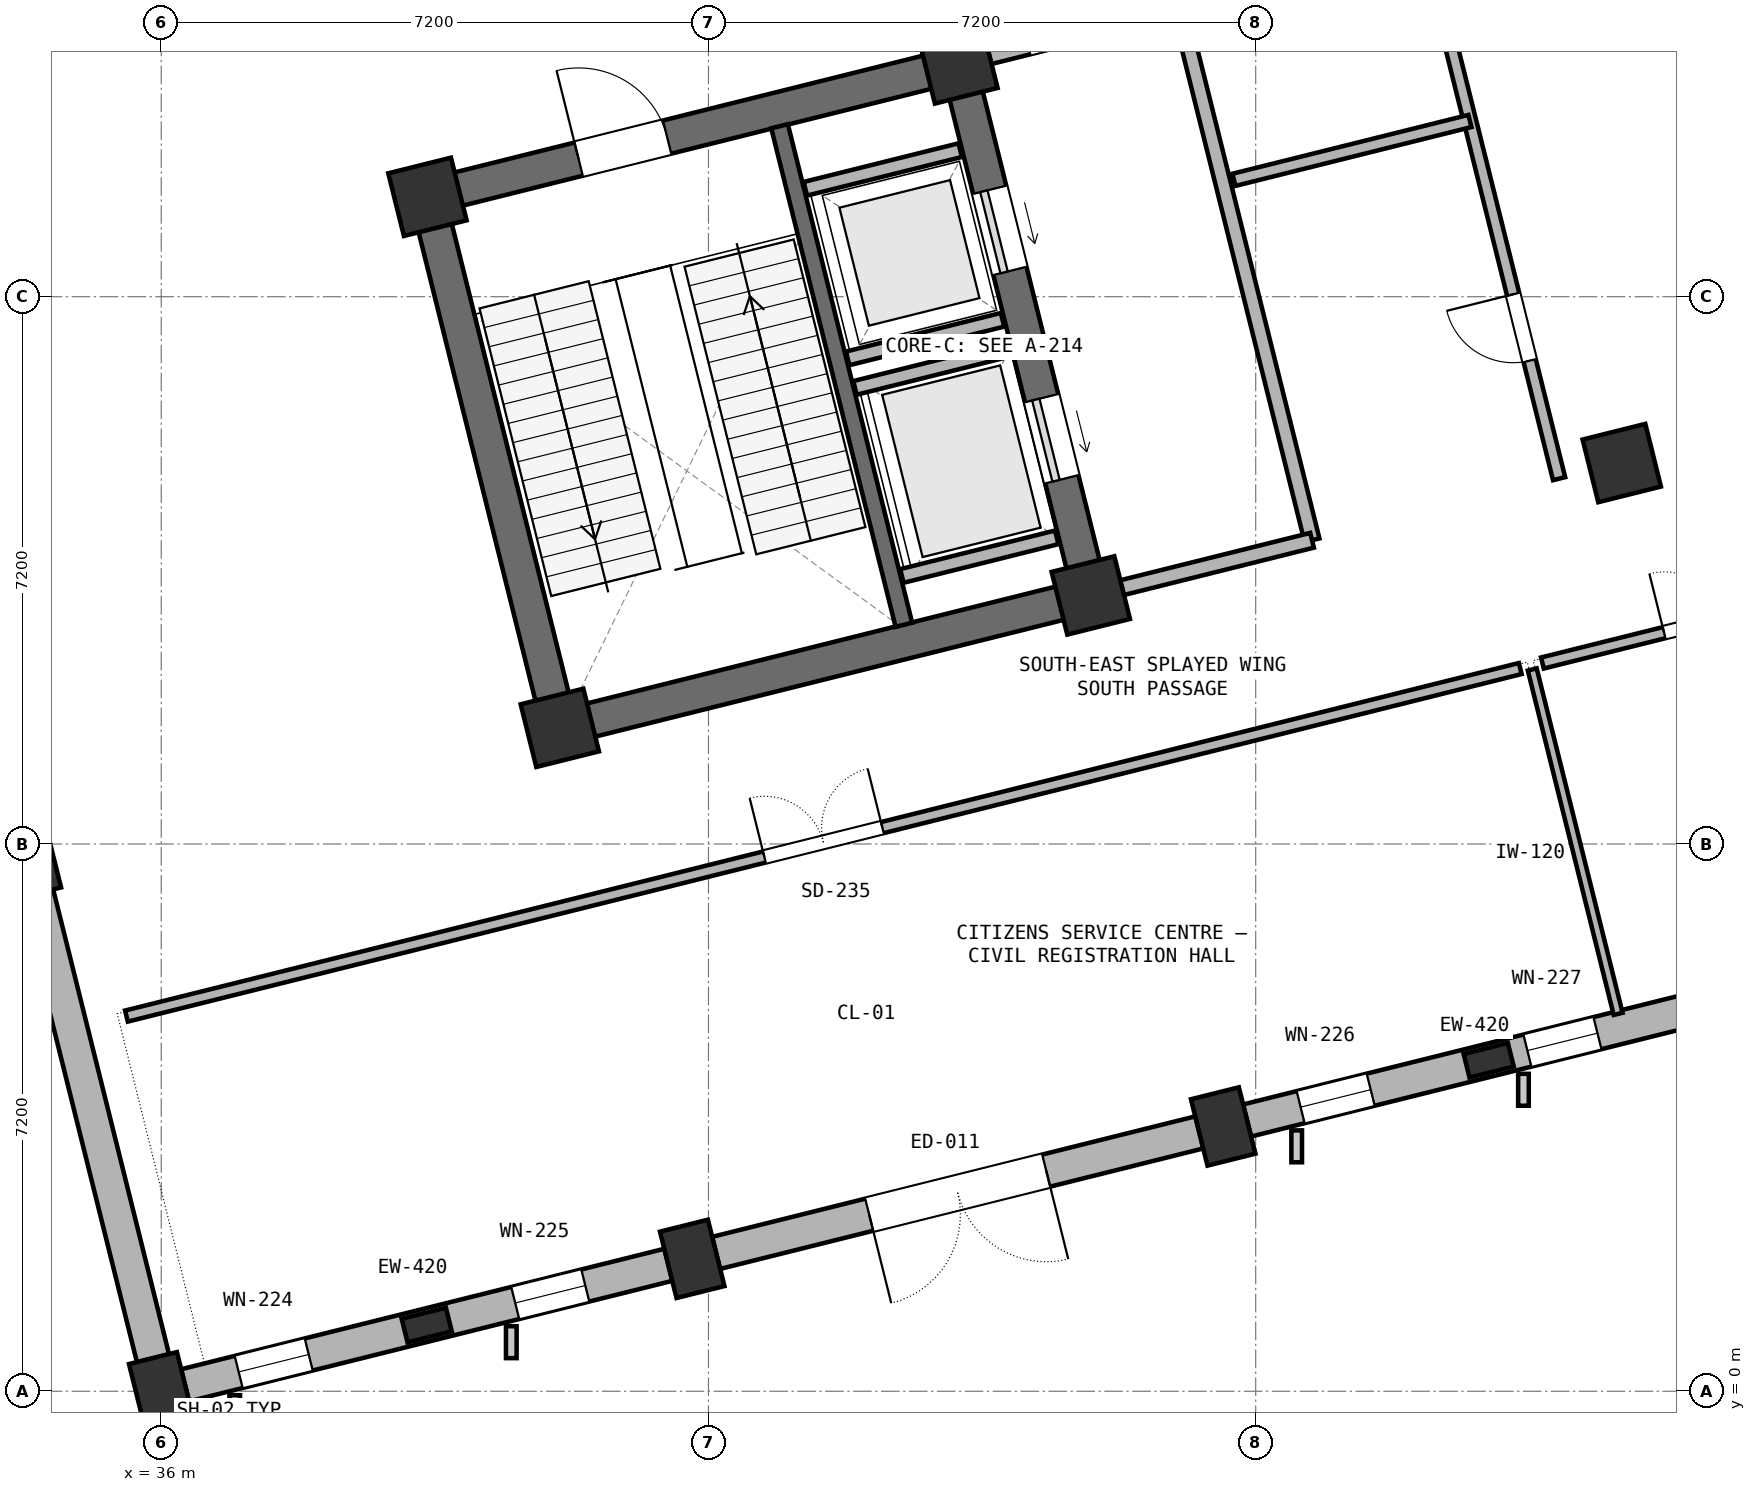
"""IFC4 building model, lengths in metres.
Left out: names, types, materials, properties, quantities, classifications, styles, units other than length and angle.
Written with IfcOpenShell. Run it as: python <this file> out.ifc"""

import sys

from ifc_helpers import new_model, si_unit, direction, frame, frame_2d, origin, origin_2d, place, context, subcontext, project, spatial, rectangle, extrude, element, fill, save


model = new_model("IFC4")
c1 = context("Model", 3, precision=1e-05, world=origin(), true_north=direction((0.0, 1.0)))
c2 = subcontext(c1, "Body", "Model", "MODEL_VIEW")
j1 = project(units=[si_unit("LENGTHUNIT", "METRE"), si_unit("PLANEANGLEUNIT", "RADIAN")], contexts=[c1])
p1 = place(None, origin())
s1 = spatial("IfcSite", under=j1, at=p1, CompositionType="ELEMENT")
p2 = place(p1, origin())
s2 = spatial("IfcBuilding", under=s1, at=p2, CompositionType="ELEMENT")
p3 = place(p2, origin())
s3 = spatial("IfcBuildingStorey", under=s2, at=p3, CompositionType="ELEMENT", Elevation=0.0)
for number, where, z_axis, x_axis in (
    (1, (36.0, 0.0, 0.0), (0.0, 0.0, 1.0), (0.97, 0.242, 0.0)),
    (2, (34.258, 6.986, 0.0), (0.0, 0.0, 1.0), (0.97, 0.242, 0.0)),
    (3, (42.986, 1.742, 0.0), (0.0, 0.0, 1.0), (0.97, 0.242, 0.0)),
):
    element("IfcColumn", number, at=place(p3, frame(where, z_axis=z_axis, x_axis=x_axis)), inside=s3, PredefinedType="COLUMN", context=c2, shape_type="SweptSolid", body=[
        extrude(rectangle(XDim=0.65, YDim=0.9, at=origin_2d()), origin(), (0.0, 0.0, 1.0), 5.4),
    ])
for number, where, z_axis, x_axis in (
    (4, (41.244, 8.728, 0.0), (0.0, 0.0, 1.0), (0.97, 0.242, 0.0)),
    (5, (39.502, 15.714, 0.0), (0.0, 0.0, 1.0), (0.97, 0.242, 0.0)),
):
    element("IfcColumn", number, at=place(p3, frame(where, z_axis=z_axis, x_axis=x_axis)), inside=s3, PredefinedType="COLUMN", context=c2, shape_type="SweptSolid", body=[
        extrude(rectangle(XDim=0.85, YDim=0.85, at=origin_2d()), origin(), (0.0, 0.0, 1.0), 5.4),
    ])
p4 = place(p3, frame((49.972, 3.484, 0.0), z_axis=(0.0, 0.0, 1.0), x_axis=(0.970295726276, 0.2419218956, 0.0)))
e6 = element("IfcColumn", 6, at=p4, inside=s3, PredefinedType="COLUMN", context=c2, shape_type="SweptSolid", body=[
    extrude(rectangle(XDim=0.65, YDim=0.9, at=origin_2d()), origin(), (0.0, 0.0, 1.0), 5.4),
])
for number, where, z_axis, x_axis in (
    (7, (48.23, 10.47, 0.0), (0.0, 0.0, 1.0), (0.97, 0.242, 0.0)),
    (8, (46.489, 17.456, 0.0), (0.0, 0.0, 1.0), (0.97, 0.242, 0.0)),
    (9, (55.217, 12.212, 0.0), (0.0, 0.0, 1.0), (0.97, 0.242, 0.0)),
):
    element("IfcColumn", number, at=place(p3, frame(where, z_axis=z_axis, x_axis=x_axis)), inside=s3, PredefinedType="COLUMN", context=c2, shape_type="SweptSolid", body=[
        extrude(rectangle(XDim=0.85, YDim=0.85, at=origin_2d()), origin(), (0.0, 0.0, 1.0), 5.4),
    ])
for number, where, z_axis, x_axis in (
    (10, (39.493, 0.871, 0.0), (0.0, 0.0, 1.0), (0.97, 0.242, 0.0)),
    (11, (53.465, 4.354, 0.0), (0.0, 0.0, 1.0), (0.97, 0.242, 0.0)),
):
    element("IfcColumn", number, at=place(p3, frame(where, z_axis=z_axis, x_axis=x_axis)), inside=s3, PredefinedType="PILASTER", context=c2, shape_type="SweptSolid", body=[
        extrude(rectangle(XDim=0.6, YDim=0.32, at=origin_2d()), origin(), (0.0, 0.0, 1.0), 5.4),
    ])
p5 = place(p3, frame((41.584, 8.813, 0.0), z_axis=(0.0, 0.0, 1.0), x_axis=(0.970294759049, 0.241925774902, 0.0)))
e12 = element("IfcWall", 12, at=p5, inside=s3, PredefinedType="SHEAR", context=c2, shape_type="SweptSolid", body=[
    extrude(rectangle(XDim=6.5, YDim=0.45, at=frame_2d((3.25, 0.0))), origin(), (0.0, 0.0, 1.0), 5.4),
])
p6 = place(p3, frame((48.146, 10.809, 0.0), z_axis=(0.0, 0.0, 1.0), x_axis=(-0.241925774902, 0.970294759049, 0.0)))
e13 = element("IfcWall", 13, at=p6, inside=s3, PredefinedType="SHEAR", context=c2, shape_type="SweptSolid", body=[
    extrude(rectangle(XDim=6.5, YDim=0.45, at=frame_2d((3.25, 0.0))), origin(), (0.0, 0.0, 1.0), 5.4),
])
p7 = place(p6, frame((1.225, 0.0, 0.0)))
e14 = element("IfcOpeningElement", 14, at=p7, cuts=e13, PredefinedType="OPENING", context=c2, shape_type="SweptSolid", body=[
    extrude(rectangle(XDim=1.1, YDim=2.2, at=frame_2d((0.55, 1.1))), frame((0.0, 0.235, 0.0), z_axis=(0.0, -1.0, 0.0), x_axis=(1.0, 0.0, 0.0)), (0.0, 0.0, 1.0), 0.47),
])
p8 = place(p6, frame((4.05, 0.0, 0.0)))
e15 = element("IfcOpeningElement", 15, at=p8, cuts=e13, PredefinedType="OPENING", context=c2, shape_type="SweptSolid", body=[
    extrude(rectangle(XDim=1.1, YDim=2.2, at=frame_2d((0.55, 1.1))), frame((0.0, 0.235, 0.0), z_axis=(0.0, -1.0, 0.0), x_axis=(1.0, 0.0, 0.0)), (0.0, 0.0, 1.0), 0.47),
])
p9 = place(p3, frame((46.149, 17.371, 0.0), z_axis=(0.0, 0.0, 1.0), x_axis=(-0.970294759049, -0.241925774902, 0.0)))
e16 = element("IfcWall", 16, at=p9, inside=s3, PredefinedType="SHEAR", context=c2, shape_type="SweptSolid", body=[
    extrude(rectangle(XDim=6.5, YDim=0.45, at=frame_2d((3.25, 0.0))), origin(), (0.0, 0.0, 1.0), 5.4),
])
p10 = place(p9, frame((3.6, 0.0, 0.0)))
e17 = element("IfcOpeningElement", 17, at=p10, cuts=e16, PredefinedType="OPENING", context=c2, shape_type="SweptSolid", body=[
    extrude(rectangle(XDim=1.2, YDim=2.2, at=frame_2d((0.6, 1.1))), frame((0.0, 0.235, 0.0), z_axis=(0.0, -1.0, 0.0), x_axis=(1.0, 0.0, 0.0)), (0.0, 0.0, 1.0), 0.47),
])
p11 = place(p3, frame((39.587, 15.375, 0.0), z_axis=(0.0, 0.0, 1.0), x_axis=(0.241925774902, -0.970294759049, 0.0)))
e18 = element("IfcWall", 18, at=p11, inside=s3, PredefinedType="SHEAR", context=c2, shape_type="SweptSolid", body=[
    extrude(rectangle(XDim=6.5, YDim=0.45, at=frame_2d((3.25, 0.0))), origin(), (0.0, 0.0, 1.0), 5.4),
])
p12 = place(p3, frame((45.771, 10.083, 0.0), z_axis=(0.0, 0.0, 1.0), x_axis=(-0.241898249226, 0.970301621673, 0.0)))
e19 = element("IfcWall", 19, at=p12, inside=s3, PredefinedType="SHEAR", context=c2, shape_type="SweptSolid", body=[
    extrude(rectangle(XDim=6.76, YDim=0.225, at=frame_2d((3.38, 0.0))), origin(), (0.0, 0.0, 1.0), 5.4),
])
for number, where, z_axis, x_axis in (
    (20, (45.745, 10.726, 0.0), (0.0, 0.0, 1.0), (0.97, 0.242, 0.0)),
    (21, (45.128, 13.2, 0.0), (0.0, 0.0, 1.0), (0.97, 0.242, 0.0)),
    (22, (45.031, 13.588, 0.0), (0.0, 0.0, 1.0), (0.97, 0.242, 0.0)),
    (23, (44.475, 15.82, 0.0), (0.0, 0.0, 1.0), (0.97, 0.242, 0.0)),
):
    element("IfcWall", number, at=place(p3, frame(where, z_axis=z_axis, x_axis=x_axis)), inside=s3, PredefinedType="PARTITIONING", context=c2, shape_type="SweptSolid", body=[
        extrude(rectangle(XDim=2.1, YDim=0.185, at=frame_2d((1.05, 0.0))), origin(), (0.0, 0.0, 1.0), 5.4),
    ])
p13 = place(p3, frame((36.313, 0.078, 0.0), z_axis=(0.0, 0.0, 1.0), x_axis=(0.970289137034, 0.241948322073, 0.0)))
e24 = element("IfcWall", 24, at=p13, inside=s3, PredefinedType="SOLIDWALL", context=c2, shape_type="SweptSolid", body=[
    extrude(rectangle(XDim=6.554, YDim=0.435, at=frame_2d((3.277, 0.0))), origin(), (0.0, 0.0, 1.0), 4.1),
])
p14 = place(p13, frame((0.727, 0.0, 0.7)))
e25 = element("IfcOpeningElement", 25, at=p14, cuts=e24, PredefinedType="OPENING", context=c2, shape_type="SweptSolid", body=[
    extrude(rectangle(XDim=0.95, YDim=2.4, at=frame_2d((0.475, 1.2))), frame((0.0, 0.228, 0.0), z_axis=(0.0, -1.0, 0.0), x_axis=(1.0, 0.0, 0.0)), (0.0, 0.0, 1.0), 0.455),
])
p15 = place(p13, frame((4.477, 0.0, 0.7)))
e26 = element("IfcOpeningElement", 26, at=p15, cuts=e24, PredefinedType="OPENING", context=c2, shape_type="SweptSolid", body=[
    extrude(rectangle(XDim=0.95, YDim=2.4, at=frame_2d((0.475, 1.2))), frame((0.0, 0.228, 0.0), z_axis=(0.0, -1.0, 0.0), x_axis=(1.0, 0.0, 0.0)), (0.0, 0.0, 1.0), 0.455),
])
p16 = place(p3, frame((43.3, 1.82, 0.0), z_axis=(0.0, 0.0, 1.0), x_axis=(0.970300061562, 0.241904507055, 0.0)))
e27 = element("IfcWall", 27, at=p16, inside=s3, PredefinedType="SOLIDWALL", context=c2, shape_type="SweptSolid", body=[
    extrude(rectangle(XDim=6.554, YDim=0.435, at=frame_2d((3.277, 0.0))), origin(), (0.0, 0.0, 1.0), 4.1),
])
p17 = place(p16, frame((2.077, 0.0, 0.0)))
e28 = element("IfcOpeningElement", 28, at=p17, cuts=e27, PredefinedType="OPENING", context=c2, shape_type="SweptSolid", body=[
    extrude(rectangle(XDim=2.4, YDim=2.8, at=frame_2d((1.2, 1.4))), frame((0.0, 0.228, 0.0), z_axis=(0.0, -1.0, 0.0), x_axis=(1.0, 0.0, 0.0)), (0.0, 0.0, 1.0), 0.455),
])
p18 = place(p3, frame((50.286, 3.562, 0.0), z_axis=(0.0, 0.0, 1.0), x_axis=(0.970291317579, 0.24193957723, 0.0)))
e29 = element("IfcWall", 29, at=p18, inside=s3, PredefinedType="SOLIDWALL", context=c2, shape_type="SweptSolid", body=[
    extrude(rectangle(XDim=6.554, YDim=0.435, at=frame_2d((3.277, 0.0))), origin(), (0.0, 0.0, 1.0), 4.1),
])
p19 = place(p18, frame((0.727, 0.0, 0.7)))
e30 = element("IfcOpeningElement", 30, at=p19, cuts=e29, PredefinedType="OPENING", context=c2, shape_type="SweptSolid", body=[
    extrude(rectangle(XDim=0.95, YDim=2.4, at=frame_2d((0.475, 1.2))), frame((0.0, 0.228, 0.0), z_axis=(0.0, -1.0, 0.0), x_axis=(1.0, 0.0, 0.0)), (0.0, 0.0, 1.0), 0.455),
])
p20 = place(p18, frame((3.802, 0.0, 0.7)))
e31 = element("IfcOpeningElement", 31, at=p20, cuts=e29, PredefinedType="OPENING", context=c2, shape_type="SweptSolid", body=[
    extrude(rectangle(XDim=0.95, YDim=2.4, at=frame_2d((0.475, 1.2))), frame((0.0, 0.228, 0.0), z_axis=(0.0, -1.0, 0.0), x_axis=(1.0, 0.0, 0.0)), (0.0, 0.0, 1.0), 0.455),
])
p21 = place(p3, frame((34.366, 6.552, 0.0), z_axis=(0.0, 0.0, 1.0), x_axis=(0.241934154531, -0.970292669699, 0.0)))
e32 = element("IfcWall", 32, at=p21, inside=s3, PredefinedType="SOLIDWALL", context=c2, shape_type="SweptSolid", body=[
    extrude(rectangle(XDim=6.304, YDim=0.435, at=frame_2d((3.152, 0.0))), origin(), (0.0, 0.0, 1.0), 4.1),
])
p22 = place(p3, frame((51.141, 11.196, 0.0), z_axis=(0.0, 0.0, 1.0), x_axis=(-0.241937193493, 0.970291911955, 0.0)))
e33 = element("IfcWall", 33, at=p22, inside=s3, PredefinedType="PARTITIONING", context=c2, shape_type="SweptSolid", body=[
    extrude(rectangle(XDim=7.2, YDim=0.2, at=frame_2d((3.6, 0.0))), origin(), (0.0, 0.0, 1.0), 4.12),
])
p23 = place(p3, frame((48.638, 10.572, 0.0), z_axis=(0.0, 0.0, 1.0), x_axis=(0.970309259708, 0.2418676095, 0.0)))
e34 = element("IfcWall", 34, at=p23, inside=s3, PredefinedType="PARTITIONING", context=c2, shape_type="SweptSolid", body=[
    extrude(rectangle(XDim=2.58, YDim=0.2, at=frame_2d((1.29, 0.0))), origin(), (0.0, 0.0, 1.0), 4.12),
])
p24 = place(p3, frame((49.399, 18.182, 0.0), z_axis=(0.0, 0.0, 1.0), x_axis=(-0.970309259708, -0.2418676095, 0.0)))
e35 = element("IfcWall", 35, at=p24, inside=s3, PredefinedType="PARTITIONING", context=c2, shape_type="SweptSolid", body=[
    extrude(rectangle(XDim=2.58, YDim=0.2, at=frame_2d((1.29, 0.0))), origin(), (0.0, 0.0, 1.0), 4.12),
])
p25 = place(p24, frame((0.55, 0.0, 0.0)))
e36 = element("IfcOpeningElement", 36, at=p25, cuts=e35, PredefinedType="OPENING", context=c2, shape_type="SweptSolid", body=[
    extrude(rectangle(XDim=1.5, YDim=2.2, at=frame_2d((0.75, 1.1))), frame((0.0, 0.11, 0.0), z_axis=(0.0, -1.0, 0.0), x_axis=(1.0, 0.0, 0.0)), (0.0, 0.0, 1.0), 0.22),
])
p26 = place(p3, frame((54.392, 12.006, 0.0), z_axis=(0.0, 0.0, 1.0), x_axis=(-0.241937193493, 0.970291911955, 0.0)))
e37 = element("IfcWall", 37, at=p26, inside=s3, PredefinedType="PARTITIONING", context=c2, shape_type="SweptSolid", body=[
    extrude(rectangle(XDim=7.2, YDim=0.165, at=frame_2d((3.6, 0.0))), origin(), (0.0, 0.0, 1.0), 4.12),
])
p27 = place(p26, frame((1.6, 0.0, 0.0)))
e38 = element("IfcOpeningElement", 38, at=p27, cuts=e37, PredefinedType="OPENING", context=c2, shape_type="SweptSolid", body=[
    extrude(rectangle(XDim=0.9, YDim=2.15, at=frame_2d((0.45, 1.075))), frame((0.0, 0.093, 0.0), z_axis=(0.0, -1.0, 0.0), x_axis=(1.0, 0.0, 0.0)), (0.0, 0.0, 1.0), 0.185),
])
p28 = place(p3, frame((50.114, 15.938, 0.0), z_axis=(0.0, 0.0, 1.0), x_axis=(0.970294894235, 0.241925232711, 0.0)))
e39 = element("IfcWall", 39, at=p28, inside=s3, PredefinedType="PARTITIONING", context=c2, shape_type="SweptSolid", body=[
    extrude(rectangle(XDim=3.2, YDim=0.165, at=frame_2d((1.6, 0.0))), origin(), (0.0, 0.0, 1.0), 4.12),
])
p29 = place(p3, frame((35.542, 4.936, 0.0), z_axis=(0.0, 0.0, 1.0), x_axis=(0.970293521635, 0.241930737758, 0.0)))
e40 = element("IfcWall", 40, at=p29, inside=s3, PredefinedType="PARTITIONING", context=c2, shape_type="SweptSolid", body=[
    extrude(rectangle(XDim=18.9, YDim=0.15, at=frame_2d((9.45, 0.0))), origin(), (0.0, 0.0, 1.0), 4.12),
])
p30 = place(p29, frame((8.65, 0.0, 0.0)))
e41 = element("IfcOpeningElement", 41, at=p30, cuts=e40, PredefinedType="OPENING", context=c2, shape_type="SweptSolid", body=[
    extrude(rectangle(XDim=1.6, YDim=2.2, at=frame_2d((0.8, 1.1))), frame((0.0, 0.085, 0.0), z_axis=(0.0, -1.0, 0.0), x_axis=(1.0, 0.0, 0.0)), (0.0, 0.0, 1.0), 0.17),
])
p31 = place(p3, frame((54.172, 9.581, 0.0), z_axis=(0.0, 0.0, 1.0), x_axis=(0.970297344298, 0.241915405976, 0.0)))
e42 = element("IfcWall", 42, at=p31, inside=s3, PredefinedType="PARTITIONING", context=c2, shape_type="SweptSolid", body=[
    extrude(rectangle(XDim=20.1, YDim=0.15, at=frame_2d((10.05, 0.0))), origin(), (0.0, 0.0, 1.0), 4.12),
])
p32 = place(p31, frame((1.65, 0.0, 0.0)))
e43 = element("IfcOpeningElement", 43, at=p32, cuts=e42, PredefinedType="OPENING", context=c2, shape_type="SweptSolid", body=[
    extrude(rectangle(XDim=1.6, YDim=2.2, at=frame_2d((0.8, 1.1))), frame((0.0, 0.085, 0.0), z_axis=(0.0, -1.0, 0.0), x_axis=(1.0, 0.0, 0.0)), (0.0, 0.0, 1.0), 0.17),
])
p33 = place(p3, frame((55.168, 4.965, 0.0), z_axis=(0.0, 0.0, 1.0), x_axis=(-0.241883650802, 0.970305260975, 0.0)))
e44 = element("IfcWall", 44, at=p33, inside=s3, PredefinedType="PARTITIONING", context=c2, shape_type="SweptSolid", body=[
    extrude(rectangle(XDim=4.67, YDim=0.12, at=frame_2d((2.335, 0.0))), origin(), (0.0, 0.0, 1.0), 4.12),
])
p34 = place(p3, frame((57.242, 13.18, 0.0), z_axis=(0.0, 0.0, 1.0), x_axis=(-0.241947566099, 0.970289325541, 0.0)))
e45 = element("IfcWall", 45, at=p34, inside=s3, PredefinedType="PARTITIONING", context=c2, shape_type="SweptSolid", body=[
    extrude(rectangle(XDim=6.35, YDim=0.12, at=frame_2d((3.175, 0.0))), origin(), (0.0, 0.0, 1.0), 4.12),
])
p35 = place(p7, origin())
e46 = element("IfcDoor", 46, at=p35, inside=s3, OperationType="SLIDING_TO_LEFT", PredefinedType="DOOR", context=c2, shape_type="SweptSolid", body=[
    extrude(rectangle(XDim=1.1, YDim=2.2, at=frame_2d((0.55, 1.1))), frame((0.0, 0.025, 0.0), z_axis=(0.0, -1.0, 0.0), x_axis=(1.0, 0.0, 0.0)), (0.0, 0.0, 1.0), 0.05),
])
fill(e14, e46)
p36 = place(p8, origin())
e47 = element("IfcDoor", 47, at=p36, inside=s3, OperationType="SLIDING_TO_LEFT", PredefinedType="DOOR", context=c2, shape_type="SweptSolid", body=[
    extrude(rectangle(XDim=1.1, YDim=2.2, at=frame_2d((0.55, 1.1))), frame((0.0, 0.025, 0.0), z_axis=(0.0, -1.0, 0.0), x_axis=(1.0, 0.0, 0.0)), (0.0, 0.0, 1.0), 0.05),
])
fill(e15, e47)
p37 = place(p14, origin())
e48 = element("IfcWindow", 48, at=p37, inside=s3, PartitioningType="SINGLE_PANEL", PredefinedType="WINDOW", context=c2, shape_type="SweptSolid", body=[
    extrude(rectangle(XDim=0.95, YDim=2.4, at=frame_2d((0.475, 1.2))), frame((0.0, 0.03, 0.0), z_axis=(0.0, -1.0, 0.0), x_axis=(1.0, 0.0, 0.0)), (0.0, 0.0, 1.0), 0.06),
])
fill(e25, e48)
p38 = place(p15, origin())
e49 = element("IfcWindow", 49, at=p38, inside=s3, PartitioningType="SINGLE_PANEL", PredefinedType="WINDOW", context=c2, shape_type="SweptSolid", body=[
    extrude(rectangle(XDim=0.95, YDim=2.4, at=frame_2d((0.475, 1.2))), frame((0.0, 0.03, 0.0), z_axis=(0.0, -1.0, 0.0), x_axis=(1.0, 0.0, 0.0)), (0.0, 0.0, 1.0), 0.06),
])
fill(e26, e49)
p39 = place(p17, frame((2.4, 0.0, 0.0), z_axis=(0.0, 0.0, 1.0), x_axis=(-1.0, 0.0, 0.0)))
e50 = element("IfcDoor", 50, at=p39, inside=s3, OperationType="DOUBLE_DOOR_SINGLE_SWING", PredefinedType="DOOR", context=c2, shape_type="SweptSolid", body=[
    extrude(rectangle(XDim=2.4, YDim=2.8, at=frame_2d((1.2, 1.4))), frame((0.0, 0.025, 0.0), z_axis=(0.0, -1.0, 0.0), x_axis=(1.0, 0.0, 0.0)), (0.0, 0.0, 1.0), 0.05),
])
fill(e28, e50)
p40 = place(p19, origin())
e51 = element("IfcWindow", 51, at=p40, inside=s3, PartitioningType="SINGLE_PANEL", PredefinedType="WINDOW", context=c2, shape_type="SweptSolid", body=[
    extrude(rectangle(XDim=0.95, YDim=2.4, at=frame_2d((0.475, 1.2))), frame((0.0, 0.03, 0.0), z_axis=(0.0, -1.0, 0.0), x_axis=(1.0, 0.0, 0.0)), (0.0, 0.0, 1.0), 0.06),
])
fill(e30, e51)
p41 = place(p20, origin())
e52 = element("IfcWindow", 52, at=p41, inside=s3, PartitioningType="SINGLE_PANEL", PredefinedType="WINDOW", context=c2, shape_type="SweptSolid", body=[
    extrude(rectangle(XDim=0.95, YDim=2.4, at=frame_2d((0.475, 1.2))), frame((0.0, 0.03, 0.0), z_axis=(0.0, -1.0, 0.0), x_axis=(1.0, 0.0, 0.0)), (0.0, 0.0, 1.0), 0.06),
])
fill(e31, e52)
p42 = place(p10, frame((1.2, 0.0, 0.0), z_axis=(0.0, 0.0, 1.0), x_axis=(-1.0, 0.0, 0.0)))
e53 = element("IfcDoor", 53, at=p42, inside=s3, OperationType="SINGLE_SWING_LEFT", PredefinedType="DOOR", context=c2, shape_type="SweptSolid", body=[
    extrude(rectangle(XDim=1.2, YDim=2.2, at=frame_2d((0.6, 1.1))), frame((0.0, 0.025, 0.0), z_axis=(0.0, -1.0, 0.0), x_axis=(1.0, 0.0, 0.0)), (0.0, 0.0, 1.0), 0.05),
])
fill(e17, e53)
p43 = place(p27, origin())
e54 = element("IfcDoor", 54, at=p43, inside=s3, OperationType="SINGLE_SWING_RIGHT", PredefinedType="DOOR", context=c2, shape_type="SweptSolid", body=[
    extrude(rectangle(XDim=0.9, YDim=2.15, at=frame_2d((0.45, 1.075))), frame((0.0, 0.025, 0.0), z_axis=(0.0, -1.0, 0.0), x_axis=(1.0, 0.0, 0.0)), (0.0, 0.0, 1.0), 0.05),
])
fill(e38, e54)
p44 = place(p30, origin())
e55 = element("IfcDoor", 55, at=p44, inside=s3, OperationType="DOUBLE_DOOR_SINGLE_SWING", PredefinedType="DOOR", context=c2, shape_type="SweptSolid", body=[
    extrude(rectangle(XDim=1.6, YDim=2.2, at=frame_2d((0.8, 1.1))), frame((0.0, 0.025, 0.0), z_axis=(0.0, -1.0, 0.0), x_axis=(1.0, 0.0, 0.0)), (0.0, 0.0, 1.0), 0.05),
])
fill(e41, e55)
p45 = place(p32, origin())
e56 = element("IfcDoor", 56, at=p45, inside=s3, OperationType="DOUBLE_DOOR_SINGLE_SWING", PredefinedType="DOOR", context=c2, shape_type="SweptSolid", body=[
    extrude(rectangle(XDim=1.6, YDim=2.2, at=frame_2d((0.8, 1.1))), frame((0.0, 0.025, 0.0), z_axis=(0.0, -1.0, 0.0), x_axis=(1.0, 0.0, 0.0)), (0.0, 0.0, 1.0), 0.05),
])
fill(e43, e56)
save(model, sys.argv[1])
